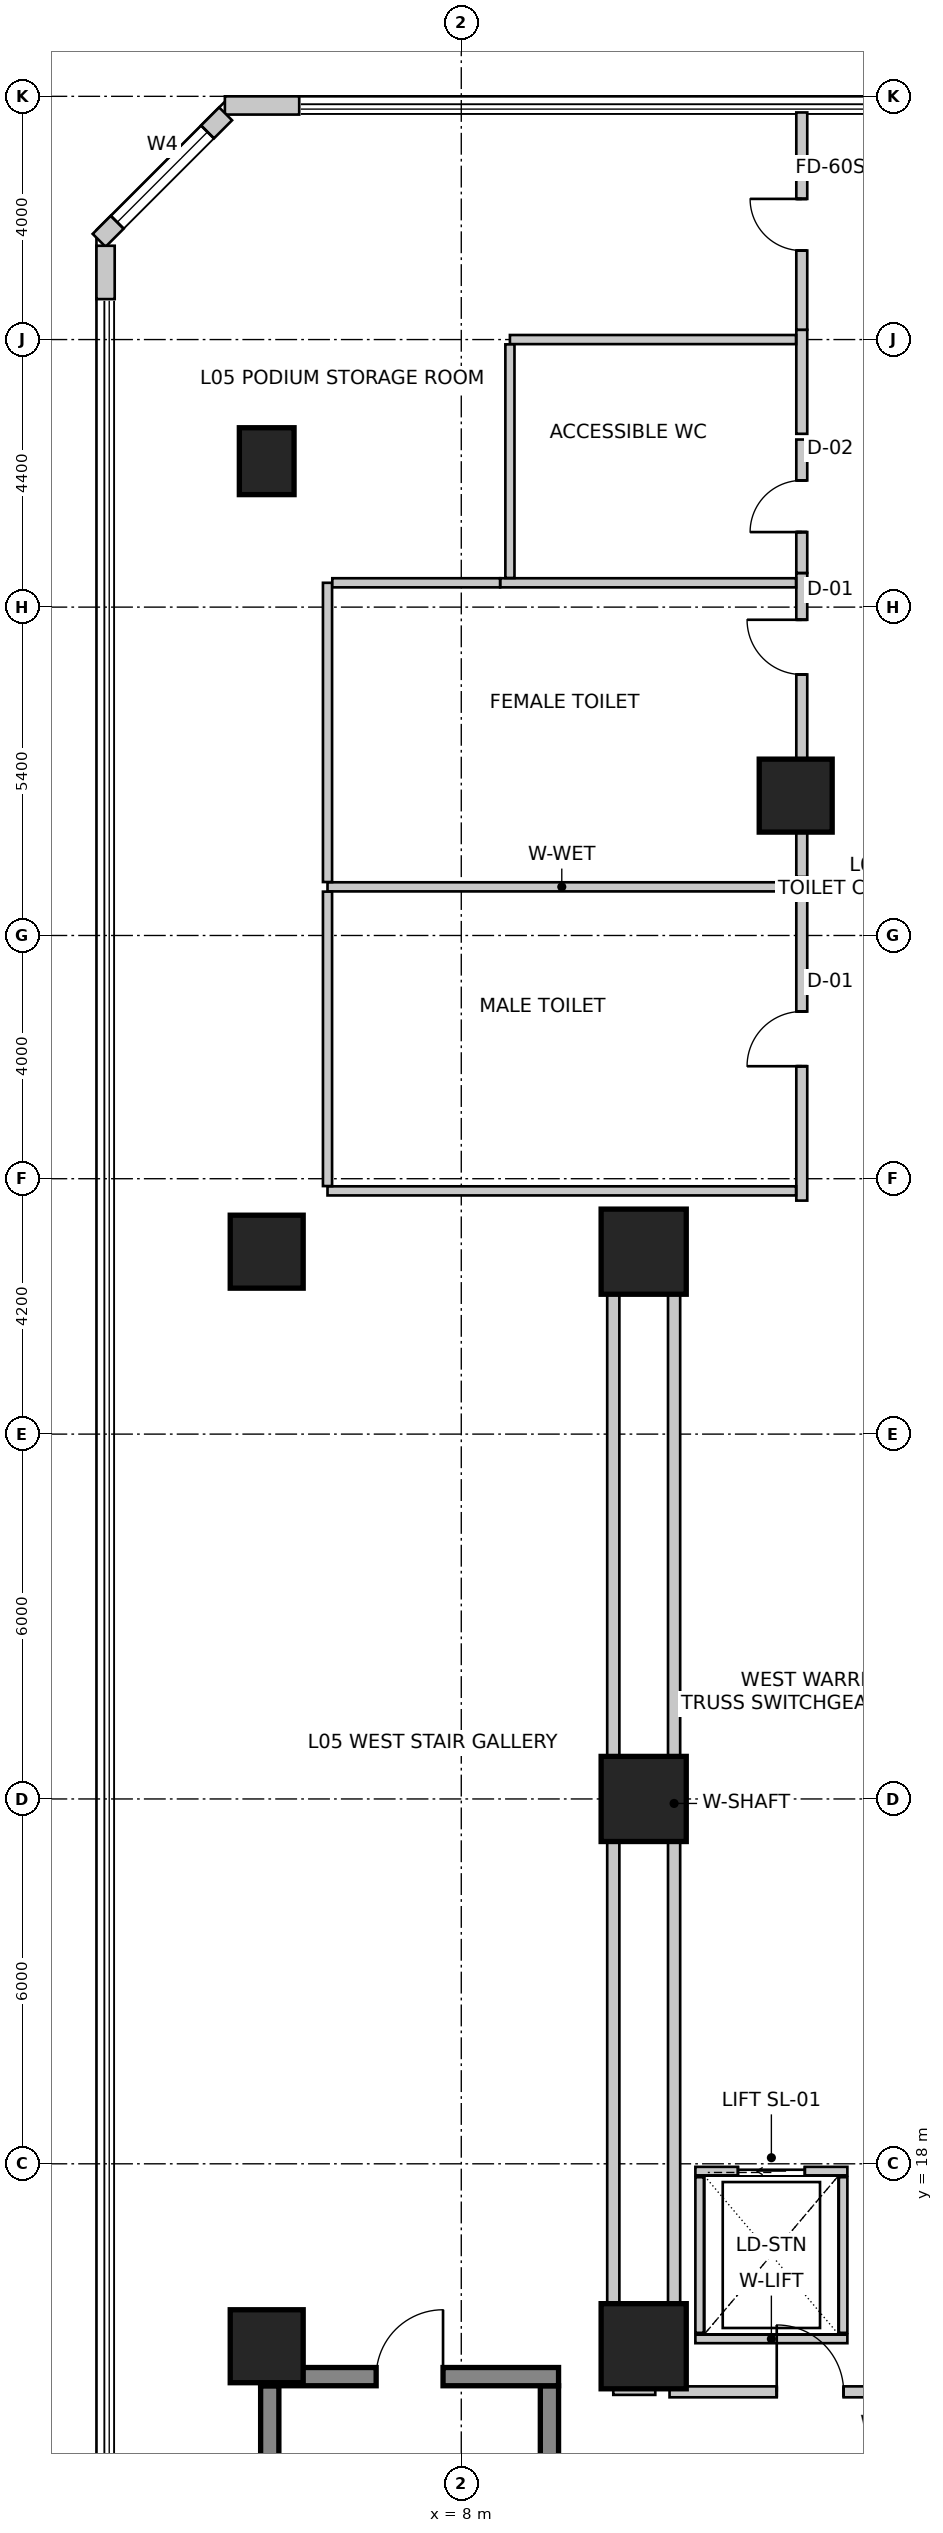
"""IFC4 building model, lengths in metres.
Left out: names, types, materials, properties, quantities, classifications, styles, units other than length and angle.
Written with IfcOpenShell. Run it as: python <this file> out.ifc"""

import sys

from ifc_helpers import new_model, si_unit, direction, frame, frame_2d, origin, origin_2d, place, context, subcontext, project, spatial, rectangle, extrude, source, transform, mapped, element, fill, save


model = new_model("IFC4")
c1 = context("Model", 3, precision=1e-05, world=origin(), true_north=direction((0.0, 1.0)))
c2 = subcontext(c1, "Body", "Model", "MODEL_VIEW")
j1 = project(units=[si_unit("LENGTHUNIT", "METRE"), si_unit("PLANEANGLEUNIT", "RADIAN")], contexts=[c1])
p1 = place(None, origin())
s1 = spatial("IfcSite", under=j1, at=p1, CompositionType="ELEMENT")
p2 = place(p1, origin())
s2 = spatial("IfcBuilding", under=s1, at=p2, CompositionType="ELEMENT")
p3 = place(p2, frame((0.0, 0.0, 21.6)))
s3 = spatial("IfcBuildingStorey", under=s2, at=p3, CompositionType="ELEMENT", Elevation=21.6)
for number, where, z_axis, x_axis in (
    (1, (4.85, 4.45, 0.0), (0.0, 0.0, 1.0), (0.0, 1.0, 0.0)),
    (2, (9.45, 4.45, 0.0), (0.0, 0.0, 1.0), (0.0, 1.0, 0.0)),
):
    element("IfcWall", number, at=place(p3, frame(where, z_axis=z_axis, x_axis=x_axis)), inside=s3, PredefinedType="SHEAR", context=c2, shape_type="SweptSolid", body=[
        extrude(rectangle(XDim=9.9, YDim=0.3, at=frame_2d((4.95, 0.0))), origin(), (0.0, 0.0, 1.0), 5.4),
    ])
p4 = place(p3, frame((4.7, 14.5, 0.0), z_axis=(0.0, 0.0, 1.0), x_axis=(1.0, 0.0, 0.0)))
e3 = element("IfcWall", 3, at=p4, inside=s3, PredefinedType="SHEAR", context=c2, shape_type="SweptSolid", body=[
    extrude(rectangle(XDim=4.9, YDim=0.3, at=frame_2d((2.45, 0.0))), origin(), (0.0, 0.0, 1.0), 5.4),
])
m1 = source(origin(), c2, "Body", "SweptSolid", [
    extrude(rectangle(XDim=1.1, YDim=2.15, at=frame_2d((0.55, 1.075))), frame((0.0, 0.16, 0.0), z_axis=(0.0, -1.0, 0.0), x_axis=(1.0, 0.0, 0.0)), (0.0, 0.0, 1.0), 0.32),
])
p5 = place(p4, frame((1.9, 0.0, 0.0)))
e4 = element("IfcOpeningElement", 4, at=p5, cuts=e3, PredefinedType="OPENING", context=c2, shape_type="MappedRepresentation", body=[
    mapped(m1, transform((0.0, 0.0, 0.0), scale=1.0)),
])
m2 = source(origin(), c2, "Body", "SweptSolid", [
    extrude(rectangle(XDim=1.2, YDim=1.2, at=origin_2d()), origin(), (0.0, 0.0, 1.0), 5.4),
])
p6 = place(p3, frame((4.8, 15.0, 0.0), z_axis=(0.0, 0.0, 1.0), x_axis=(1.0, 0.0, 0.0)))
e5 = element("IfcColumn", 5, at=p6, inside=s3, PredefinedType="COLUMN", context=c2, shape_type="MappedRepresentation", body=[
    mapped(m2, transform((0.0, 0.0, 0.0), scale=1.0)),
])
m3 = source(origin(), c2, "Body", "SweptSolid", [
    extrude(rectangle(XDim=1.4, YDim=1.4, at=origin_2d()), origin(), (0.0, 0.0, 1.0), 5.4),
])
for number, where, z_axis, x_axis in (
    (6, (11.0, 15.0, 0.0), (0.0, 0.0, 1.0), (1.0, 0.0, 0.0)),
    (7, (11.0, 24.0, 0.0), (0.0, 0.0, 1.0), (1.0, 0.0, 0.0)),
):
    element("IfcColumn", number, at=place(p3, frame(where, z_axis=z_axis, x_axis=x_axis)), inside=s3, PredefinedType="COLUMN", context=c2, shape_type="MappedRepresentation", body=[
        mapped(m3, transform((0.0, 0.0, 0.0), scale=1.0)),
    ])
p7 = place(p3, frame((4.8, 33.0, 0.0), z_axis=(0.0, 0.0, 1.0), x_axis=(1.0, 0.0, 0.0)))
e8 = element("IfcColumn", 8, at=p7, inside=s3, PredefinedType="COLUMN", context=c2, shape_type="MappedRepresentation", body=[
    mapped(m2, transform((0.0, 0.0, 0.0), scale=1.0)),
])
p8 = place(p3, frame((11.0, 33.0, 0.0), z_axis=(0.0, 0.0, 1.0), x_axis=(1.0, 0.0, 0.0)))
e9 = element("IfcColumn", 9, at=p8, inside=s3, PredefinedType="COLUMN", context=c2, shape_type="MappedRepresentation", body=[
    mapped(m3, transform((0.0, 0.0, 0.0), scale=1.0)),
])
m4 = source(origin(), c2, "Body", "SweptSolid", [
    extrude(rectangle(XDim=0.9, YDim=1.1, at=origin_2d()), origin(), (0.0, 0.0, 1.0), 5.4),
])
p9 = place(p3, frame((4.8, 46.0, 0.0), z_axis=(0.0, 0.0, 1.0), x_axis=(1.0, 0.0, 0.0)))
e10 = element("IfcColumn", 10, at=p9, inside=s3, PredefinedType="COLUMN", context=c2, shape_type="MappedRepresentation", body=[
    mapped(m4, transform((0.0, 0.0, 0.0), scale=1.0)),
])
p10 = place(p3, frame((13.5, 40.5, 0.0), z_axis=(0.0, 0.0, 1.0), x_axis=(1.0, 0.0, 0.0)))
e11 = element("IfcColumn", 11, at=p10, inside=s3, PredefinedType="COLUMN", context=c2, shape_type="MappedRepresentation", body=[
    mapped(m2, transform((0.0, 0.0, 0.0), scale=1.0)),
])
p11 = place(p3, frame((5.335, 51.85, 0.0), z_axis=(0.0, 0.0, 1.0), x_axis=(-1.0, 0.0, 0.0)))
e12 = element("IfcWall", 12, at=p11, inside=s3, PredefinedType="SOLIDWALL", context=c2, shape_type="SweptSolid", body=[
    extrude(rectangle(XDim=1.223, YDim=0.3, at=frame_2d((0.611, 0.0))), origin(), (0.0, 0.0, 1.0), 5.05),
])
p12 = place(p3, frame((4.124, 51.712, 0.0), z_axis=(0.0, 0.0, 1.0), x_axis=(-0.707106781187, -0.707106781187, 0.0)))
e13 = element("IfcWall", 13, at=p12, inside=s3, PredefinedType="SOLIDWALL", context=c2, shape_type="SweptSolid", body=[
    extrude(rectangle(XDim=2.942, YDim=0.3, at=frame_2d((1.471, 0.0))), origin(), (0.0, 0.0, 1.0), 5.05),
])
m5 = source(origin(), c2, "Body", "SweptSolid", [
    extrude(rectangle(XDim=2.1, YDim=2.0, at=frame_2d((1.05, 1.0))), frame((0.0, 0.16, 0.0), z_axis=(0.0, -1.0, 0.0), x_axis=(1.0, 0.0, 0.0)), (0.0, 0.0, 1.0), 0.32),
])
p13 = place(p12, frame((0.421, 0.0, 0.85)))
e14 = element("IfcOpeningElement", 14, at=p13, cuts=e13, PredefinedType="OPENING", context=c2, shape_type="MappedRepresentation", body=[
    mapped(m5, transform((0.0, 0.0, 0.0), scale=1.0)),
])
p14 = place(p3, frame((2.15, 49.543, 0.0), z_axis=(0.0, 0.0, 1.0), x_axis=(0.0, -1.0, 0.0)))
e15 = element("IfcWall", 15, at=p14, inside=s3, PredefinedType="SOLIDWALL", context=c2, shape_type="SweptSolid", body=[
    extrude(rectangle(XDim=0.877, YDim=0.3, at=frame_2d((0.439, 0.0))), origin(), (0.0, 0.0, 1.0), 5.05),
])
p15 = place(p3, frame((11.85, 17.88, 0.0), z_axis=(0.0, 0.0, 1.0), x_axis=(1.0, 0.0, 0.0)))
e16 = element("IfcWall", 16, at=p15, inside=s3, PredefinedType="SOLIDWALL", context=c2, shape_type="SweptSolid", body=[
    extrude(rectangle(XDim=2.5, YDim=0.14, at=frame_2d((1.25, 0.0))), origin(), (0.0, 0.0, 1.0), 5.05),
])
m6 = source(origin(), c2, "Body", "SweptSolid", [
    extrude(rectangle(XDim=1.1, YDim=2.15, at=frame_2d((0.55, 1.075))), frame((0.0, 0.08, 0.0), z_axis=(0.0, -1.0, 0.0), x_axis=(1.0, 0.0, 0.0)), (0.0, 0.0, 1.0), 0.16),
])
p16 = place(p15, frame((0.7, 0.0, 0.0)))
e17 = element("IfcOpeningElement", 17, at=p16, cuts=e16, PredefinedType="OPENING", context=c2, shape_type="MappedRepresentation", body=[
    mapped(m6, transform((0.0, 0.0, 0.0), scale=1.0)),
])
p17 = place(p3, frame((11.85, 15.12, 0.0), z_axis=(0.0, 0.0, 1.0), x_axis=(1.0, 0.0, 0.0)))
e18 = element("IfcWall", 18, at=p17, inside=s3, PredefinedType="SOLIDWALL", context=c2, shape_type="SweptSolid", body=[
    extrude(rectangle(XDim=2.5, YDim=0.14, at=frame_2d((1.25, 0.0))), origin(), (0.0, 0.0, 1.0), 3.822),
])
for number, where, z_axis, x_axis in (
    (19, (11.92, 15.22, 0.0), (0.0, 0.0, 1.0), (0.0, 1.0, 0.0)),
    (20, (14.28, 15.22, 0.0), (0.0, 0.0, 1.0), (0.0, 1.0, 0.0)),
):
    element("IfcWall", number, at=place(p3, frame(where, z_axis=z_axis, x_axis=x_axis)), inside=s3, PredefinedType="SOLIDWALL", context=c2, shape_type="SweptSolid", body=[
        extrude(rectangle(XDim=2.56, YDim=0.14, at=frame_2d((1.28, 0.0))), origin(), (0.0, 0.0, 1.0), 5.05),
    ])
p18 = place(p3, frame((11.425, 14.25, 0.0), z_axis=(0.0, 0.0, 1.0), x_axis=(1.0, 0.0, 0.0)))
e21 = element("IfcWall", 21, at=p18, inside=s3, PredefinedType="PARTITIONING", context=c2, shape_type="SweptSolid", body=[
    extrude(rectangle(XDim=4.75, YDim=0.18, at=frame_2d((2.375, 0.0))), origin(), (0.0, 0.0, 1.0), 5.05),
])
m7 = source(origin(), c2, "Body", "SweptSolid", [
    extrude(rectangle(XDim=1.1, YDim=2.15, at=frame_2d((0.55, 1.075))), frame((0.0, 0.1, 0.0), z_axis=(0.0, -1.0, 0.0), x_axis=(1.0, 0.0, 0.0)), (0.0, 0.0, 1.0), 0.2),
])
p19 = place(p18, frame((1.763, 0.0, 0.0)))
e22 = element("IfcOpeningElement", 22, at=p19, cuts=e21, PredefinedType="OPENING", context=c2, shape_type="MappedRepresentation", body=[
    mapped(m7, transform((0.0, 0.0, 0.0), scale=1.0)),
])
p20 = place(p3, frame((13.6, 46.45, 0.0), z_axis=(0.0, 0.0, 1.0), x_axis=(0.0, 1.0, 0.0)))
e23 = element("IfcWall", 23, at=p20, inside=s3, PredefinedType="PARTITIONING", context=c2, shape_type="SweptSolid", body=[
    extrude(rectangle(XDim=1.71, YDim=0.18, at=frame_2d((0.855, 0.0))), origin(), (0.0, 0.0, 1.0), 5.05),
])
p21 = place(p3, frame((13.6, 48.162, 0.0), z_axis=(0.0, 0.0, 1.0), x_axis=(0.0, 1.0, 0.0)))
e24 = element("IfcWall", 24, at=p21, inside=s3, PredefinedType="PARTITIONING", context=c2, shape_type="SweptSolid", body=[
    extrude(rectangle(XDim=3.573, YDim=0.18, at=frame_2d((1.787, 0.0))), origin(), (0.0, 0.0, 1.0), 5.05),
])
m8 = source(origin(), c2, "Body", "SweptSolid", [
    extrude(rectangle(XDim=0.85, YDim=2.15, at=frame_2d((0.425, 1.075))), frame((0.0, 0.1, 0.0), z_axis=(0.0, -1.0, 0.0), x_axis=(1.0, 0.0, 0.0)), (0.0, 0.0, 1.0), 0.2),
])
p22 = place(p21, frame((1.302, 0.0, 0.0)))
e25 = element("IfcOpeningElement", 25, at=p22, cuts=e24, PredefinedType="OPENING", context=c2, shape_type="MappedRepresentation", body=[
    mapped(m8, transform((0.0, 0.0, 0.0), scale=1.0)),
])
p23 = place(p3, frame((13.6, 33.84, 0.0), z_axis=(0.0, 0.0, 1.0), x_axis=(0.0, 1.0, 0.0)))
e26 = element("IfcWall", 26, at=p23, inside=s3, PredefinedType="PARTITIONING", context=c2, shape_type="SweptSolid", body=[
    extrude(rectangle(XDim=5.32, YDim=0.18, at=frame_2d((2.66, 0.0))), origin(), (0.0, 0.0, 1.0), 5.05),
])
m9 = source(origin(), c2, "Body", "SweptSolid", [
    extrude(rectangle(XDim=0.9, YDim=2.15, at=frame_2d((0.45, 1.075))), frame((0.0, 0.1, 0.0), z_axis=(0.0, -1.0, 0.0), x_axis=(1.0, 0.0, 0.0)), (0.0, 0.0, 1.0), 0.2),
])
p24 = place(p23, frame((2.21, 0.0, 0.0)))
e27 = element("IfcOpeningElement", 27, at=p24, cuts=e26, PredefinedType="OPENING", context=c2, shape_type="MappedRepresentation", body=[
    mapped(m9, transform((0.0, 0.0, 0.0), scale=1.0)),
])
p25 = place(p3, frame((13.6, 39.162, 0.0), z_axis=(0.0, 0.0, 1.0), x_axis=(0.0, 1.0, 0.0)))
e28 = element("IfcWall", 28, at=p25, inside=s3, PredefinedType="PARTITIONING", context=c2, shape_type="SweptSolid", body=[
    extrude(rectangle(XDim=4.998, YDim=0.18, at=frame_2d((2.499, 0.0))), origin(), (0.0, 0.0, 1.0), 3.842),
])
p26 = place(p25, frame((3.33, 0.0, 0.0)))
e29 = element("IfcOpeningElement", 29, at=p26, cuts=e28, PredefinedType="OPENING", context=c2, shape_type="MappedRepresentation", body=[
    mapped(m9, transform((0.0, 0.0, 0.0), scale=1.0)),
])
p27 = place(p3, frame((13.6, 44.162, 0.0), z_axis=(0.0, 0.0, 1.0), x_axis=(0.0, 1.0, 0.0)))
e30 = element("IfcWall", 30, at=p27, inside=s3, PredefinedType="PARTITIONING", context=c2, shape_type="SweptSolid", body=[
    extrude(rectangle(XDim=2.194, YDim=0.18, at=frame_2d((1.097, 0.0))), origin(), (0.0, 0.0, 1.0), 5.05),
])
p28 = place(p27, frame((0.672, 0.0, 0.0)))
e31 = element("IfcOpeningElement", 31, at=p28, cuts=e30, PredefinedType="OPENING", context=c2, shape_type="MappedRepresentation", body=[
    mapped(m8, transform((0.0, 0.0, 0.0), scale=1.0)),
])
for number, where, z_axis, x_axis in (
    (32, (5.8, 39.0, 0.0), (0.0, 0.0, 1.0), (1.0, 0.0, 0.0)),
    (33, (13.506, 34.0, 0.0), (0.0, 0.0, 1.0), (-1.0, 0.0, 0.0)),
):
    element("IfcWall", number, at=place(p3, frame(where, z_axis=z_axis, x_axis=x_axis)), inside=s3, PredefinedType="PARTITIONING", context=c2, shape_type="SweptSolid", body=[
        extrude(rectangle(XDim=7.706, YDim=0.15, at=frame_2d((3.853, 0.0))), origin(), (0.0, 0.0, 1.0), 3.842),
    ])
p29 = place(p3, frame((5.8, 34.079, 0.0), z_axis=(0.0, 0.0, 1.0), x_axis=(0.0, 1.0, 0.0)))
e34 = element("IfcWall", 34, at=p29, inside=s3, PredefinedType="PARTITIONING", context=c2, shape_type="SweptSolid", body=[
    extrude(rectangle(XDim=4.842, YDim=0.15, at=frame_2d((2.421, 0.0))), origin(), (0.0, 0.0, 1.0), 5.05),
])
p30 = place(p3, frame((8.64, 44.0, 0.0), z_axis=(0.0, 0.0, 1.0), x_axis=(1.0, 0.0, 0.0)))
e35 = element("IfcWall", 35, at=p30, inside=s3, PredefinedType="PARTITIONING", context=c2, shape_type="SweptSolid", body=[
    extrude(rectangle(XDim=4.866, YDim=0.15, at=frame_2d((2.433, 0.0))), origin(), (0.0, 0.0, 1.0), 5.05),
])
p31 = place(p3, frame((5.8, 39.079, 0.0), z_axis=(0.0, 0.0, 1.0), x_axis=(0.0, 1.0, 0.0)))
e36 = element("IfcWall", 36, at=p31, inside=s3, PredefinedType="PARTITIONING", context=c2, shape_type="SweptSolid", body=[
    extrude(rectangle(XDim=4.921, YDim=0.15, at=frame_2d((2.46, 0.0))), origin(), (0.0, 0.0, 1.0), 5.05),
])
p32 = place(p3, frame((5.879, 44.0, 0.0), z_axis=(0.0, 0.0, 1.0), x_axis=(1.0, 0.0, 0.0)))
e37 = element("IfcWall", 37, at=p32, inside=s3, PredefinedType="PARTITIONING", context=c2, shape_type="SweptSolid", body=[
    extrude(rectangle(XDim=2.759, YDim=0.15, at=frame_2d((1.379, 0.0))), origin(), (0.0, 0.0, 1.0), 3.842),
])
p33 = place(p3, frame((8.8, 48.0, 0.0), z_axis=(0.0, 0.0, 1.0), x_axis=(1.0, 0.0, 0.0)))
e38 = element("IfcWall", 38, at=p33, inside=s3, PredefinedType="PARTITIONING", context=c2, shape_type="SweptSolid", body=[
    extrude(rectangle(XDim=4.706, YDim=0.15, at=frame_2d((2.353, 0.0))), origin(), (0.0, 0.0, 1.0), 5.05),
])
p34 = place(p3, frame((8.8, 44.079, 0.0), z_axis=(0.0, 0.0, 1.0), x_axis=(0.0, 1.0, 0.0)))
e39 = element("IfcWall", 39, at=p34, inside=s3, PredefinedType="PARTITIONING", context=c2, shape_type="SweptSolid", body=[
    extrude(rectangle(XDim=3.842, YDim=0.15, at=frame_2d((1.921, 0.0))), origin(), (0.0, 0.0, 1.0), 5.05),
])
p35 = place(p3, frame((11.5, 33.362, 0.0), z_axis=(0.0, 0.0, 1.0), x_axis=(0.0, -1.0, 0.0)))
e40 = element("IfcWall", 40, at=p35, inside=s3, PredefinedType="SOLIDWALL", context=c2, shape_type="SweptSolid", body=[
    extrude(rectangle(XDim=18.872, YDim=0.2, at=frame_2d((9.436, 0.0))), origin(), (0.0, 0.0, 1.0), 3.042),
])
p36 = place(p3, frame((11.191, 14.3, 0.0), z_axis=(0.0, 0.0, 1.0), x_axis=(-1.0, 0.0, 0.0)))
e41 = element("IfcWall", 41, at=p36, inside=s3, PredefinedType="SOLIDWALL", context=c2, shape_type="SweptSolid", body=[
    extrude(rectangle(XDim=0.691, YDim=0.2, at=frame_2d((0.345, 0.0))), origin(), (0.0, 0.0, 1.0), 5.05),
])
p37 = place(p3, frame((10.5, 14.3, 0.0), z_axis=(0.0, 0.0, 1.0), x_axis=(0.0, 1.0, 0.0)))
e42 = element("IfcWall", 42, at=p37, inside=s3, PredefinedType="SOLIDWALL", context=c2, shape_type="SweptSolid", body=[
    extrude(rectangle(XDim=19.112, YDim=0.2, at=frame_2d((9.556, 0.0))), origin(), (0.0, 0.0, 1.0), 3.042),
])
m10 = source(origin(), c2, "Body", "SweptSolid", [
    extrude(rectangle(XDim=2.1, YDim=2.0, at=frame_2d((1.05, 1.0))), frame((0.0, -0.015, 0.0), z_axis=(0.0, -1.0, 0.0), x_axis=(1.0, 0.0, 0.0)), (0.0, 0.0, 1.0), 0.06),
])
p38 = place(p13, origin())
e43 = element("IfcWindow", 43, at=p38, inside=s3, PartitioningType="SINGLE_PANEL", PredefinedType="WINDOW", context=c2, shape_type="MappedRepresentation", body=[
    mapped(m10, transform((0.0, 0.0, 0.0), scale=1.0)),
])
fill(e14, e43)
m11 = source(origin(), c2, "Body", "SweptSolid", [
    extrude(rectangle(XDim=1.1, YDim=2.15, at=frame_2d((0.55, 1.075))), frame((0.0, 0.025, 0.0), z_axis=(0.0, -1.0, 0.0), x_axis=(1.0, 0.0, 0.0)), (0.0, 0.0, 1.0), 0.05),
])
p39 = place(p16, origin())
e44 = element("IfcDoor", 44, at=p39, inside=s3, OperationType="SLIDING_TO_LEFT", PredefinedType="DOOR", context=c2, shape_type="MappedRepresentation", body=[
    mapped(m11, transform((0.0, 0.0, 0.0), scale=1.0)),
])
fill(e17, e44)
m12 = source(origin(), c2, "Body", "SweptSolid", [
    extrude(rectangle(XDim=1.1, YDim=2.15, at=frame_2d((0.55, 1.075))), frame((0.0, 0.025, 0.0), z_axis=(0.0, -1.0, 0.0), x_axis=(1.0, 0.0, 0.0)), (0.0, 0.0, 1.0), 0.05),
])
p40 = place(p5, origin())
e45 = element("IfcDoor", 45, at=p40, inside=s3, OperationType="SINGLE_SWING_RIGHT", PredefinedType="DOOR", context=c2, shape_type="MappedRepresentation", body=[
    mapped(m12, transform((0.0, 0.0, 0.0), scale=1.0)),
])
fill(e4, e45)
m13 = source(origin(), c2, "Body", "SweptSolid", [
    extrude(rectangle(XDim=0.9, YDim=2.15, at=frame_2d((0.45, 1.075))), frame((0.0, 0.025, 0.0), z_axis=(0.0, -1.0, 0.0), x_axis=(1.0, 0.0, 0.0)), (0.0, 0.0, 1.0), 0.05),
])
p41 = place(p24, origin())
e46 = element("IfcDoor", 46, at=p41, inside=s3, OperationType="SINGLE_SWING_LEFT", PredefinedType="DOOR", context=c2, shape_type="MappedRepresentation", body=[
    mapped(m13, transform((0.0, 0.0, 0.0), scale=1.0)),
])
fill(e27, e46)
p42 = place(p26, origin())
e47 = element("IfcDoor", 47, at=p42, inside=s3, OperationType="SINGLE_SWING_RIGHT", PredefinedType="DOOR", context=c2, shape_type="MappedRepresentation", body=[
    mapped(m13, transform((0.0, 0.0, 0.0), scale=1.0)),
])
fill(e29, e47)
m14 = source(origin(), c2, "Body", "SweptSolid", [
    extrude(rectangle(XDim=0.85, YDim=2.15, at=frame_2d((0.425, 1.075))), frame((0.0, 0.025, 0.0), z_axis=(0.0, -1.0, 0.0), x_axis=(1.0, 0.0, 0.0)), (0.0, 0.0, 1.0), 0.05),
])
p43 = place(p28, origin())
e48 = element("IfcDoor", 48, at=p43, inside=s3, OperationType="SINGLE_SWING_LEFT", PredefinedType="DOOR", context=c2, shape_type="MappedRepresentation", body=[
    mapped(m14, transform((0.0, 0.0, 0.0), scale=1.0)),
])
fill(e31, e48)
m15 = source(origin(), c2, "Body", "SweptSolid", [
    extrude(rectangle(XDim=0.85, YDim=2.15, at=frame_2d((0.425, 1.075))), frame((0.0, 0.025, 0.0), z_axis=(0.0, -1.0, 0.0), x_axis=(1.0, 0.0, 0.0)), (0.0, 0.0, 1.0), 0.05),
])
p44 = place(p22, origin())
e49 = element("IfcDoor", 49, at=p44, inside=s3, OperationType="SINGLE_SWING_RIGHT", PredefinedType="DOOR", context=c2, shape_type="MappedRepresentation", body=[
    mapped(m15, transform((0.0, 0.0, 0.0), scale=1.0)),
])
fill(e25, e49)
p45 = place(p19, origin())
e50 = element("IfcDoor", 50, at=p45, inside=s3, OperationType="SINGLE_SWING_LEFT", PredefinedType="DOOR", context=c2, shape_type="MappedRepresentation", body=[
    mapped(m12, transform((0.0, 0.0, 0.0), scale=1.0)),
])
fill(e22, e50)
save(model, sys.argv[1])
